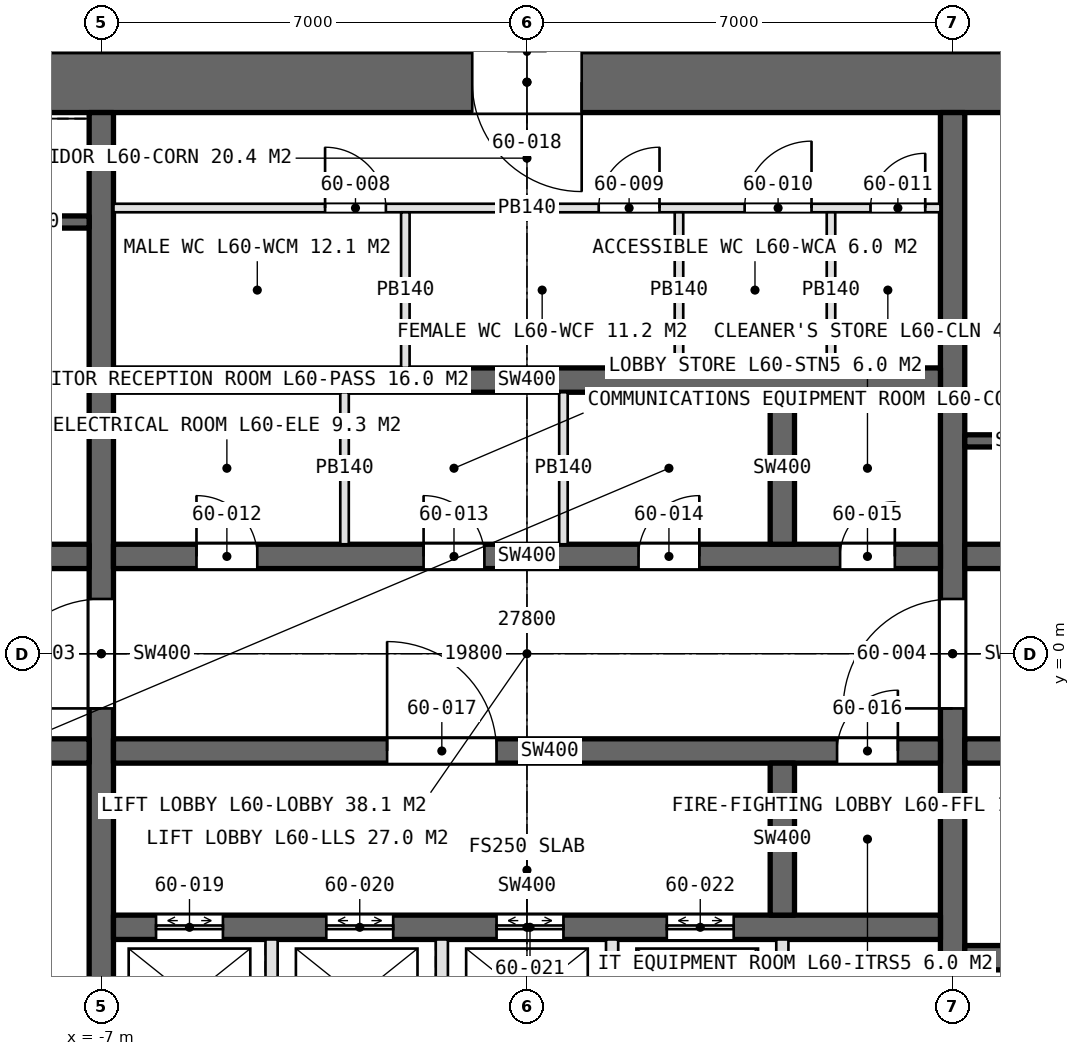
"""IFC4 building model, lengths in metres.
Left out: names, types, materials, properties, quantities, classifications, styles, units other than length and angle.
Written with IfcOpenShell. Run it as: python <this file> out.ifc"""

import sys

from ifc_helpers import new_model, si_unit, direction, frame, frame_2d, origin, place, context, subcontext, project, spatial, rectangle, extrude, element, fill, save


model = new_model("IFC4")
c1 = context("Model", 3, precision=1e-05, world=origin(), true_north=direction((0.0, 1.0)))
c2 = subcontext(c1, "Body", "Model", "MODEL_VIEW")
j1 = project(units=[si_unit("LENGTHUNIT", "METRE"), si_unit("PLANEANGLEUNIT", "RADIAN")], contexts=[c1])
p1 = place(None, origin())
s1 = spatial("IfcSite", under=j1, at=p1, CompositionType="ELEMENT")
p2 = place(p1, origin())
s2 = spatial("IfcBuilding", under=s1, at=p2, CompositionType="ELEMENT")
p3 = place(p2, frame((0.0, 0.0, 271.2)))
s3 = spatial("IfcBuildingStorey", under=s2, at=p3, CompositionType="ELEMENT", Elevation=271.2)
p4 = place(p3, frame((13.9, 9.4, 0.0), z_axis=(0.0, 0.0, 1.0), x_axis=(-1.0, 0.0, 0.0)))
e1 = element("IfcWall", 1, at=p4, inside=s3, PredefinedType="SHEAR", context=c2, shape_type="SweptSolid", body=[
    extrude(rectangle(XDim=27.8, YDim=1.0, at=frame_2d((13.9, 0.0))), origin(), (0.0, 0.0, 1.0), 4.2),
])
p5 = place(p4, frame((23.9, 0.0, 0.0)))
e2 = element("IfcOpeningElement", 2, at=p5, cuts=e1, PredefinedType="OPENING", context=c2, shape_type="SweptSolid", body=[
    extrude(rectangle(XDim=1.0, YDim=2.4, at=frame_2d((0.5, 1.2))), frame((0.0, 0.51, 0.0), z_axis=(0.0, -1.0, 0.0), x_axis=(1.0, 0.0, 0.0)), (0.0, 0.0, 1.0), 1.02),
])
p6 = place(p4, frame((13.0, 0.0, 0.0)))
e3 = element("IfcOpeningElement", 3, at=p6, cuts=e1, PredefinedType="OPENING", context=c2, shape_type="SweptSolid", body=[
    extrude(rectangle(XDim=1.8, YDim=2.4, at=frame_2d((0.9, 1.2))), frame((0.0, 0.51, 0.0), z_axis=(0.0, -1.0, 0.0), x_axis=(1.0, 0.0, 0.0)), (0.0, 0.0, 1.0), 1.02),
])
p7 = place(p3, frame((-7.0, -8.9, 0.0), z_axis=(0.0, 0.0, 1.0), x_axis=(0.0, 1.0, 0.0)))
e4 = element("IfcWall", 4, at=p7, inside=s3, PredefinedType="SHEAR", context=c2, shape_type="SweptSolid", body=[
    extrude(rectangle(XDim=17.8, YDim=0.4, at=frame_2d((8.9, 0.0))), origin(), (0.0, 0.0, 1.0), 4.2),
])
p8 = place(p7, frame((8.0, 0.0, 0.0)))
e5 = element("IfcOpeningElement", 5, at=p8, cuts=e4, PredefinedType="OPENING", context=c2, shape_type="SweptSolid", body=[
    extrude(rectangle(XDim=1.8, YDim=2.4, at=frame_2d((0.9, 1.2))), frame((0.0, 0.21, 0.0), z_axis=(0.0, -1.0, 0.0), x_axis=(1.0, 0.0, 0.0)), (0.0, 0.0, 1.0), 0.42),
])
p9 = place(p3, frame((7.0, -8.9, 0.0), z_axis=(0.0, 0.0, 1.0), x_axis=(0.0, 1.0, 0.0)))
e6 = element("IfcWall", 6, at=p9, inside=s3, PredefinedType="SHEAR", context=c2, shape_type="SweptSolid", body=[
    extrude(rectangle(XDim=17.8, YDim=0.4, at=frame_2d((8.9, 0.0))), origin(), (0.0, 0.0, 1.0), 4.2),
])
p10 = place(p9, frame((8.0, 0.0, 0.0)))
e7 = element("IfcOpeningElement", 7, at=p10, cuts=e6, PredefinedType="OPENING", context=c2, shape_type="SweptSolid", body=[
    extrude(rectangle(XDim=1.8, YDim=2.4, at=frame_2d((0.9, 1.2))), frame((0.0, 0.21, 0.0), z_axis=(0.0, -1.0, 0.0), x_axis=(1.0, 0.0, 0.0)), (0.0, 0.0, 1.0), 0.42),
])
p11 = place(p3, frame((-6.8, 1.6, 0.0), z_axis=(0.0, 0.0, 1.0), x_axis=(1.0, 0.0, 0.0)))
e8 = element("IfcWall", 8, at=p11, inside=s3, PredefinedType="SHEAR", context=c2, shape_type="SweptSolid", body=[
    extrude(rectangle(XDim=13.6, YDim=0.4, at=frame_2d((6.8, 0.0))), origin(), (0.0, 0.0, 1.0), 4.2),
])
p12 = place(p11, frame((1.365, 0.0, 0.0)))
e9 = element("IfcOpeningElement", 9, at=p12, cuts=e8, PredefinedType="OPENING", context=c2, shape_type="SweptSolid", body=[
    extrude(rectangle(XDim=1.0, YDim=2.4, at=frame_2d((0.5, 1.2))), frame((0.0, 0.21, 0.0), z_axis=(0.0, -1.0, 0.0), x_axis=(1.0, 0.0, 0.0)), (0.0, 0.0, 1.0), 0.42),
])
p13 = place(p11, frame((5.1, 0.0, 0.0)))
e10 = element("IfcOpeningElement", 10, at=p13, cuts=e8, PredefinedType="OPENING", context=c2, shape_type="SweptSolid", body=[
    extrude(rectangle(XDim=1.0, YDim=2.4, at=frame_2d((0.5, 1.2))), frame((0.0, 0.21, 0.0), z_axis=(0.0, -1.0, 0.0), x_axis=(1.0, 0.0, 0.0)), (0.0, 0.0, 1.0), 0.42),
])
p14 = place(p11, frame((8.635, 0.0, 0.0)))
e11 = element("IfcOpeningElement", 11, at=p14, cuts=e8, PredefinedType="OPENING", context=c2, shape_type="SweptSolid", body=[
    extrude(rectangle(XDim=1.0, YDim=2.4, at=frame_2d((0.5, 1.2))), frame((0.0, 0.21, 0.0), z_axis=(0.0, -1.0, 0.0), x_axis=(1.0, 0.0, 0.0)), (0.0, 0.0, 1.0), 0.42),
])
p15 = place(p11, frame((11.95, 0.0, 0.0)))
e12 = element("IfcOpeningElement", 12, at=p15, cuts=e8, PredefinedType="OPENING", context=c2, shape_type="SweptSolid", body=[
    extrude(rectangle(XDim=0.9, YDim=2.4, at=frame_2d((0.45, 1.2))), frame((0.0, 0.21, 0.0), z_axis=(0.0, -1.0, 0.0), x_axis=(1.0, 0.0, 0.0)), (0.0, 0.0, 1.0), 0.42),
])
p16 = place(p3, frame((-6.8, -1.6, 0.0), z_axis=(0.0, 0.0, 1.0), x_axis=(1.0, 0.0, 0.0)))
e13 = element("IfcWall", 13, at=p16, inside=s3, PredefinedType="SHEAR", context=c2, shape_type="SweptSolid", body=[
    extrude(rectangle(XDim=13.6, YDim=0.4, at=frame_2d((6.8, 0.0))), origin(), (0.0, 0.0, 1.0), 4.2),
])
p17 = place(p16, frame((11.9, 0.0, 0.0)))
e14 = element("IfcOpeningElement", 14, at=p17, cuts=e13, PredefinedType="OPENING", context=c2, shape_type="SweptSolid", body=[
    extrude(rectangle(XDim=1.0, YDim=2.4, at=frame_2d((0.5, 1.2))), frame((0.0, 0.21, 0.0), z_axis=(0.0, -1.0, 0.0), x_axis=(1.0, 0.0, 0.0)), (0.0, 0.0, 1.0), 0.42),
])
p18 = place(p16, frame((4.5, 0.0, 0.0)))
e15 = element("IfcOpeningElement", 15, at=p18, cuts=e13, PredefinedType="OPENING", context=c2, shape_type="SweptSolid", body=[
    extrude(rectangle(XDim=1.8, YDim=2.4, at=frame_2d((0.9, 1.2))), frame((0.0, 0.21, 0.0), z_axis=(0.0, -1.0, 0.0), x_axis=(1.0, 0.0, 0.0)), (0.0, 0.0, 1.0), 0.42),
])
p19 = place(p3, frame((-6.8, 4.5, 0.0), z_axis=(0.0, 0.0, 1.0), x_axis=(1.0, 0.0, 0.0)))
e16 = element("IfcWall", 16, at=p19, inside=s3, PredefinedType="SHEAR", context=c2, shape_type="SweptSolid", body=[
    extrude(rectangle(XDim=13.6, YDim=0.4, at=frame_2d((6.8, 0.0))), origin(), (0.0, 0.0, 1.0), 4.2),
])
p20 = place(p3, frame((-6.8, -4.5, 0.0), z_axis=(0.0, 0.0, 1.0), x_axis=(1.0, 0.0, 0.0)))
e17 = element("IfcWall", 17, at=p20, inside=s3, PredefinedType="SHEAR", context=c2, shape_type="SweptSolid", body=[
    extrude(rectangle(XDim=13.6, YDim=0.4, at=frame_2d((6.8, 0.0))), origin(), (0.0, 0.0, 1.0), 4.2),
])
p21 = place(p20, frame((0.7, 0.0, 0.0)))
e18 = element("IfcOpeningElement", 18, at=p21, cuts=e17, PredefinedType="OPENING", context=c2, shape_type="SweptSolid", body=[
    extrude(rectangle(XDim=1.1, YDim=2.4, at=frame_2d((0.55, 1.2))), frame((0.0, 0.21, 0.0), z_axis=(0.0, -1.0, 0.0), x_axis=(1.0, 0.0, 0.0)), (0.0, 0.0, 1.0), 0.42),
])
p22 = place(p20, frame((3.5, 0.0, 0.0)))
e19 = element("IfcOpeningElement", 19, at=p22, cuts=e17, PredefinedType="OPENING", context=c2, shape_type="SweptSolid", body=[
    extrude(rectangle(XDim=1.1, YDim=2.4, at=frame_2d((0.55, 1.2))), frame((0.0, 0.21, 0.0), z_axis=(0.0, -1.0, 0.0), x_axis=(1.0, 0.0, 0.0)), (0.0, 0.0, 1.0), 0.42),
])
p23 = place(p20, frame((6.3, 0.0, 0.0)))
e20 = element("IfcOpeningElement", 20, at=p23, cuts=e17, PredefinedType="OPENING", context=c2, shape_type="SweptSolid", body=[
    extrude(rectangle(XDim=1.1, YDim=2.4, at=frame_2d((0.55, 1.2))), frame((0.0, 0.21, 0.0), z_axis=(0.0, -1.0, 0.0), x_axis=(1.0, 0.0, 0.0)), (0.0, 0.0, 1.0), 0.42),
])
p24 = place(p20, frame((9.1, 0.0, 0.0)))
e21 = element("IfcOpeningElement", 21, at=p24, cuts=e17, PredefinedType="OPENING", context=c2, shape_type="SweptSolid", body=[
    extrude(rectangle(XDim=1.1, YDim=2.4, at=frame_2d((0.55, 1.2))), frame((0.0, 0.21, 0.0), z_axis=(0.0, -1.0, 0.0), x_axis=(1.0, 0.0, 0.0)), (0.0, 0.0, 1.0), 0.42),
])
for number, where, z_axis, x_axis in (
    (22, (-12.9, 1.6, 0.0), (0.0, 0.0, 1.0), (1.0, 0.0, 0.0)),
    (23, (-12.9, -1.6, 0.0), (0.0, 0.0, 1.0), (1.0, 0.0, 0.0)),
):
    element("IfcWall", number, at=place(p3, frame(where, z_axis=z_axis, x_axis=x_axis)), inside=s3, PredefinedType="SHEAR", context=c2, shape_type="SweptSolid", body=[
        extrude(rectangle(XDim=5.7, YDim=0.4, at=frame_2d((2.85, 0.0))), origin(), (0.0, 0.0, 1.0), 4.2),
    ])
p25 = place(p3, frame((7.2, 1.6, 0.0), z_axis=(0.0, 0.0, 1.0), x_axis=(1.0, 0.0, 0.0)))
e24 = element("IfcWall", 24, at=p25, inside=s3, PredefinedType="SHEAR", context=c2, shape_type="SweptSolid", body=[
    extrude(rectangle(XDim=5.7, YDim=0.4, at=frame_2d((2.85, 0.0))), origin(), (0.0, 0.0, 1.0), 4.2),
])
p26 = place(p25, frame((0.7, 0.0, 0.0)))
e25 = element("IfcOpeningElement", 25, at=p26, cuts=e24, PredefinedType="OPENING", context=c2, shape_type="SweptSolid", body=[
    extrude(rectangle(XDim=1.0, YDim=2.4, at=frame_2d((0.5, 1.2))), frame((0.0, 0.21, 0.0), z_axis=(0.0, -1.0, 0.0), x_axis=(1.0, 0.0, 0.0)), (0.0, 0.0, 1.0), 0.42),
])
p27 = place(p3, frame((7.2, -1.6, 0.0), z_axis=(0.0, 0.0, 1.0), x_axis=(1.0, 0.0, 0.0)))
e26 = element("IfcWall", 26, at=p27, inside=s3, PredefinedType="SHEAR", context=c2, shape_type="SweptSolid", body=[
    extrude(rectangle(XDim=5.7, YDim=0.4, at=frame_2d((2.85, 0.0))), origin(), (0.0, 0.0, 1.0), 4.2),
])
p28 = place(p27, frame((0.9, 0.0, 0.0)))
e27 = element("IfcOpeningElement", 27, at=p28, cuts=e26, PredefinedType="OPENING", context=c2, shape_type="SweptSolid", body=[
    extrude(rectangle(XDim=1.3, YDim=2.4, at=frame_2d((0.65, 1.2))), frame((0.0, 0.21, 0.0), z_axis=(0.0, -1.0, 0.0), x_axis=(1.0, 0.0, 0.0)), (0.0, 0.0, 1.0), 0.42),
])
p29 = place(p27, frame((3.95, 0.0, 0.0)))
e28 = element("IfcOpeningElement", 28, at=p29, cuts=e26, PredefinedType="OPENING", context=c2, shape_type="SweptSolid", body=[
    extrude(rectangle(XDim=1.3, YDim=2.4, at=frame_2d((0.65, 1.2))), frame((0.0, 0.21, 0.0), z_axis=(0.0, -1.0, 0.0), x_axis=(1.0, 0.0, 0.0)), (0.0, 0.0, 1.0), 0.42),
])
p30 = place(p3, frame((7.2, -5.0, 0.0), z_axis=(0.0, 0.0, 1.0), x_axis=(1.0, 0.0, 0.0)))
e29 = element("IfcWall", 29, at=p30, inside=s3, PredefinedType="SHEAR", context=c2, shape_type="SweptSolid", body=[
    extrude(rectangle(XDim=5.7, YDim=0.4, at=frame_2d((2.85, 0.0))), origin(), (0.0, 0.0, 1.0), 4.2),
])
for number, where, z_axis, x_axis in (
    (30, (4.2, 1.8, 0.0), (0.0, 0.0, 1.0), (0.0, 1.0, 0.0)),
    (31, (4.2, -4.3, 0.0), (0.0, 0.0, 1.0), (0.0, 1.0, 0.0)),
):
    element("IfcWall", number, at=place(p3, frame(where, z_axis=z_axis, x_axis=x_axis)), inside=s3, PredefinedType="SHEAR", context=c2, shape_type="SweptSolid", body=[
        extrude(rectangle(XDim=2.5, YDim=0.4, at=frame_2d((1.25, 0.0))), origin(), (0.0, 0.0, 1.0), 4.2),
    ])
p31 = place(p3, frame((-6.8, 7.33, 0.0), z_axis=(0.0, 0.0, 1.0), x_axis=(1.0, 0.0, 0.0)))
e32 = element("IfcWall", 32, at=p31, inside=s3, PredefinedType="PARTITIONING", context=c2, shape_type="SweptSolid", body=[
    extrude(rectangle(XDim=13.6, YDim=0.14, at=frame_2d((6.8, 0.0))), origin(), (0.0, 0.0, 1.0), 3.95),
])
p32 = place(p31, frame((3.48, 0.0, 0.0)))
e33 = element("IfcOpeningElement", 33, at=p32, cuts=e32, PredefinedType="OPENING", context=c2, shape_type="SweptSolid", body=[
    extrude(rectangle(XDim=1.0, YDim=2.4, at=frame_2d((0.5, 1.2))), frame((0.0, 0.08, 0.0), z_axis=(0.0, -1.0, 0.0), x_axis=(1.0, 0.0, 0.0)), (0.0, 0.0, 1.0), 0.16),
])
p33 = place(p31, frame((7.98, 0.0, 0.0)))
e34 = element("IfcOpeningElement", 34, at=p33, cuts=e32, PredefinedType="OPENING", context=c2, shape_type="SweptSolid", body=[
    extrude(rectangle(XDim=1.0, YDim=2.4, at=frame_2d((0.5, 1.2))), frame((0.0, 0.08, 0.0), z_axis=(0.0, -1.0, 0.0), x_axis=(1.0, 0.0, 0.0)), (0.0, 0.0, 1.0), 0.16),
])
p34 = place(p31, frame((10.38, 0.0, 0.0)))
e35 = element("IfcOpeningElement", 35, at=p34, cuts=e32, PredefinedType="OPENING", context=c2, shape_type="SweptSolid", body=[
    extrude(rectangle(XDim=1.1, YDim=2.4, at=frame_2d((0.55, 1.2))), frame((0.0, 0.08, 0.0), z_axis=(0.0, -1.0, 0.0), x_axis=(1.0, 0.0, 0.0)), (0.0, 0.0, 1.0), 0.16),
])
p35 = place(p31, frame((12.45, 0.0, 0.0)))
e36 = element("IfcOpeningElement", 36, at=p35, cuts=e32, PredefinedType="OPENING", context=c2, shape_type="SweptSolid", body=[
    extrude(rectangle(XDim=0.9, YDim=2.4, at=frame_2d((0.45, 1.2))), frame((0.0, 0.08, 0.0), z_axis=(0.0, -1.0, 0.0), x_axis=(1.0, 0.0, 0.0)), (0.0, 0.0, 1.0), 0.16),
])
for number, where, z_axis, x_axis in (
    (37, (-2.0, 4.7, 0.0), (0.0, 0.0, 1.0), (0.0, 1.0, 0.0)),
    (38, (2.5, 4.7, 0.0), (0.0, 0.0, 1.0), (0.0, 1.0, 0.0)),
    (39, (5.0, 4.7, 0.0), (0.0, 0.0, 1.0), (0.0, 1.0, 0.0)),
):
    element("IfcWall", number, at=place(p3, frame(where, z_axis=z_axis, x_axis=x_axis)), inside=s3, PredefinedType="PARTITIONING", context=c2, shape_type="SweptSolid", body=[
        extrude(rectangle(XDim=2.56, YDim=0.14, at=frame_2d((1.28, 0.0))), origin(), (0.0, 0.0, 1.0), 3.95),
    ])
for number, where, z_axis, x_axis in (
    (40, (-3.0, 1.8, 0.0), (0.0, 0.0, 1.0), (0.0, 1.0, 0.0)),
    (41, (0.6, 1.8, 0.0), (0.0, 0.0, 1.0), (0.0, 1.0, 0.0)),
):
    element("IfcWall", number, at=place(p3, frame(where, z_axis=z_axis, x_axis=x_axis)), inside=s3, PredefinedType="PARTITIONING", context=c2, shape_type="SweptSolid", body=[
        extrude(rectangle(XDim=2.5, YDim=0.14, at=frame_2d((1.25, 0.0))), origin(), (0.0, 0.0, 1.0), 3.95),
    ])
for number, where, z_axis, x_axis in (
    (42, (-4.2, -4.7, 0.0), (0.0, 0.0, 1.0), (0.0, -1.0, 0.0)),
    (43, (-1.4, -4.7, 0.0), (0.0, 0.0, 1.0), (0.0, -1.0, 0.0)),
    (44, (1.4, -4.7, 0.0), (0.0, 0.0, 1.0), (0.0, -1.0, 0.0)),
    (45, (4.2, -4.7, 0.0), (0.0, 0.0, 1.0), (0.0, -1.0, 0.0)),
):
    element("IfcWall", number, at=place(p3, frame(where, z_axis=z_axis, x_axis=x_axis)), inside=s3, PredefinedType="PARTITIONING", context=c2, shape_type="SweptSolid", body=[
        extrude(rectangle(XDim=4.2, YDim=0.2, at=frame_2d((2.1, 0.0))), origin(), (0.0, 0.0, 1.0), 4.2),
    ])
for number, where, z_axis, x_axis in (
    (46, (-9.15, 7.1, 0.0), (0.0, 0.0, 1.0), (1.0, 0.0, 0.0)),
    (47, (9.15, 3.5, 0.0), (0.0, 0.0, 1.0), (-1.0, 0.0, 0.0)),
):
    element("IfcWall", number, at=place(p3, frame(where, z_axis=z_axis, x_axis=x_axis)), inside=s3, PredefinedType="SOLIDWALL", context=c2, shape_type="SweptSolid", body=[
        extrude(rectangle(XDim=1.95, YDim=0.2, at=frame_2d((0.975, 0.0))), origin(), (0.0, 0.0, 1.0), 4.2),
    ])
p36 = place(p8, origin())
e48 = element("IfcDoor", 48, at=p36, inside=s3, OperationType="DOUBLE_DOOR_SINGLE_SWING", PredefinedType="DOOR", context=c2, shape_type="SweptSolid", body=[
    extrude(rectangle(XDim=1.8, YDim=2.4, at=frame_2d((0.9, 1.2))), frame((0.0, 0.025, 0.0), z_axis=(0.0, -1.0, 0.0), x_axis=(1.0, 0.0, 0.0)), (0.0, 0.0, 1.0), 0.05),
])
fill(e5, e48)
p37 = place(p10, origin())
e49 = element("IfcDoor", 49, at=p37, inside=s3, OperationType="DOUBLE_DOOR_SINGLE_SWING", PredefinedType="DOOR", context=c2, shape_type="SweptSolid", body=[
    extrude(rectangle(XDim=1.8, YDim=2.4, at=frame_2d((0.9, 1.2))), frame((0.0, 0.025, 0.0), z_axis=(0.0, -1.0, 0.0), x_axis=(1.0, 0.0, 0.0)), (0.0, 0.0, 1.0), 0.05),
])
fill(e7, e49)
p38 = place(p32, origin())
e50 = element("IfcDoor", 50, at=p38, inside=s3, OperationType="SINGLE_SWING_LEFT", PredefinedType="DOOR", context=c2, shape_type="SweptSolid", body=[
    extrude(rectangle(XDim=1.0, YDim=2.4, at=frame_2d((0.5, 1.2))), frame((0.0, 0.025, 0.0), z_axis=(0.0, -1.0, 0.0), x_axis=(1.0, 0.0, 0.0)), (0.0, 0.0, 1.0), 0.05),
])
fill(e33, e50)
p39 = place(p33, origin())
e51 = element("IfcDoor", 51, at=p39, inside=s3, OperationType="SINGLE_SWING_RIGHT", PredefinedType="DOOR", context=c2, shape_type="SweptSolid", body=[
    extrude(rectangle(XDim=1.0, YDim=2.4, at=frame_2d((0.5, 1.2))), frame((0.0, 0.025, 0.0), z_axis=(0.0, -1.0, 0.0), x_axis=(1.0, 0.0, 0.0)), (0.0, 0.0, 1.0), 0.05),
])
fill(e34, e51)
p40 = place(p34, origin())
e52 = element("IfcDoor", 52, at=p40, inside=s3, OperationType="SINGLE_SWING_RIGHT", PredefinedType="DOOR", context=c2, shape_type="SweptSolid", body=[
    extrude(rectangle(XDim=1.1, YDim=2.4, at=frame_2d((0.55, 1.2))), frame((0.0, 0.025, 0.0), z_axis=(0.0, -1.0, 0.0), x_axis=(1.0, 0.0, 0.0)), (0.0, 0.0, 1.0), 0.05),
])
fill(e35, e52)
p41 = place(p35, origin())
e53 = element("IfcDoor", 53, at=p41, inside=s3, OperationType="SINGLE_SWING_RIGHT", PredefinedType="DOOR", context=c2, shape_type="SweptSolid", body=[
    extrude(rectangle(XDim=0.9, YDim=2.4, at=frame_2d((0.45, 1.2))), frame((0.0, 0.025, 0.0), z_axis=(0.0, -1.0, 0.0), x_axis=(1.0, 0.0, 0.0)), (0.0, 0.0, 1.0), 0.05),
])
fill(e36, e53)
p42 = place(p12, origin())
e54 = element("IfcDoor", 54, at=p42, inside=s3, OperationType="SINGLE_SWING_LEFT", PredefinedType="DOOR", context=c2, shape_type="SweptSolid", body=[
    extrude(rectangle(XDim=1.0, YDim=2.4, at=frame_2d((0.5, 1.2))), frame((0.0, 0.025, 0.0), z_axis=(0.0, -1.0, 0.0), x_axis=(1.0, 0.0, 0.0)), (0.0, 0.0, 1.0), 0.05),
])
fill(e9, e54)
p43 = place(p13, origin())
e55 = element("IfcDoor", 55, at=p43, inside=s3, OperationType="SINGLE_SWING_LEFT", PredefinedType="DOOR", context=c2, shape_type="SweptSolid", body=[
    extrude(rectangle(XDim=1.0, YDim=2.4, at=frame_2d((0.5, 1.2))), frame((0.0, 0.025, 0.0), z_axis=(0.0, -1.0, 0.0), x_axis=(1.0, 0.0, 0.0)), (0.0, 0.0, 1.0), 0.05),
])
fill(e10, e55)
p44 = place(p14, origin())
e56 = element("IfcDoor", 56, at=p44, inside=s3, OperationType="SINGLE_SWING_RIGHT", PredefinedType="DOOR", context=c2, shape_type="SweptSolid", body=[
    extrude(rectangle(XDim=1.0, YDim=2.4, at=frame_2d((0.5, 1.2))), frame((0.0, 0.025, 0.0), z_axis=(0.0, -1.0, 0.0), x_axis=(1.0, 0.0, 0.0)), (0.0, 0.0, 1.0), 0.05),
])
fill(e11, e56)
p45 = place(p15, origin())
e57 = element("IfcDoor", 57, at=p45, inside=s3, OperationType="SINGLE_SWING_RIGHT", PredefinedType="DOOR", context=c2, shape_type="SweptSolid", body=[
    extrude(rectangle(XDim=0.9, YDim=2.4, at=frame_2d((0.45, 1.2))), frame((0.0, 0.025, 0.0), z_axis=(0.0, -1.0, 0.0), x_axis=(1.0, 0.0, 0.0)), (0.0, 0.0, 1.0), 0.05),
])
fill(e12, e57)
p46 = place(p17, origin())
e58 = element("IfcDoor", 58, at=p46, inside=s3, OperationType="SINGLE_SWING_RIGHT", PredefinedType="DOOR", context=c2, shape_type="SweptSolid", body=[
    extrude(rectangle(XDim=1.0, YDim=2.4, at=frame_2d((0.5, 1.2))), frame((0.0, 0.025, 0.0), z_axis=(0.0, -1.0, 0.0), x_axis=(1.0, 0.0, 0.0)), (0.0, 0.0, 1.0), 0.05),
])
fill(e14, e58)
p47 = place(p18, origin())
e59 = element("IfcDoor", 59, at=p47, inside=s3, OperationType="DOUBLE_DOOR_SINGLE_SWING", PredefinedType="DOOR", context=c2, shape_type="SweptSolid", body=[
    extrude(rectangle(XDim=1.8, YDim=2.4, at=frame_2d((0.9, 1.2))), frame((0.0, 0.025, 0.0), z_axis=(0.0, -1.0, 0.0), x_axis=(1.0, 0.0, 0.0)), (0.0, 0.0, 1.0), 0.05),
])
fill(e15, e59)
p48 = place(p6, origin())
e60 = element("IfcDoor", 60, at=p48, inside=s3, OperationType="DOUBLE_DOOR_SINGLE_SWING", PredefinedType="DOOR", context=c2, shape_type="SweptSolid", body=[
    extrude(rectangle(XDim=1.8, YDim=2.4, at=frame_2d((0.9, 1.2))), frame((0.0, 0.025, 0.0), z_axis=(0.0, -1.0, 0.0), x_axis=(1.0, 0.0, 0.0)), (0.0, 0.0, 1.0), 0.05),
])
fill(e3, e60)
p49 = place(p21, origin())
e61 = element("IfcDoor", 61, at=p49, inside=s3, OperationType="DOUBLE_DOOR_SLIDING", PredefinedType="DOOR", context=c2, shape_type="SweptSolid", body=[
    extrude(rectangle(XDim=1.1, YDim=2.4, at=frame_2d((0.55, 1.2))), frame((0.0, 0.025, 0.0), z_axis=(0.0, -1.0, 0.0), x_axis=(1.0, 0.0, 0.0)), (0.0, 0.0, 1.0), 0.05),
])
fill(e18, e61)
p50 = place(p22, origin())
e62 = element("IfcDoor", 62, at=p50, inside=s3, OperationType="DOUBLE_DOOR_SLIDING", PredefinedType="DOOR", context=c2, shape_type="SweptSolid", body=[
    extrude(rectangle(XDim=1.1, YDim=2.4, at=frame_2d((0.55, 1.2))), frame((0.0, 0.025, 0.0), z_axis=(0.0, -1.0, 0.0), x_axis=(1.0, 0.0, 0.0)), (0.0, 0.0, 1.0), 0.05),
])
fill(e19, e62)
p51 = place(p23, origin())
e63 = element("IfcDoor", 63, at=p51, inside=s3, OperationType="DOUBLE_DOOR_SLIDING", PredefinedType="DOOR", context=c2, shape_type="SweptSolid", body=[
    extrude(rectangle(XDim=1.1, YDim=2.4, at=frame_2d((0.55, 1.2))), frame((0.0, 0.025, 0.0), z_axis=(0.0, -1.0, 0.0), x_axis=(1.0, 0.0, 0.0)), (0.0, 0.0, 1.0), 0.05),
])
fill(e20, e63)
p52 = place(p24, origin())
e64 = element("IfcDoor", 64, at=p52, inside=s3, OperationType="DOUBLE_DOOR_SLIDING", PredefinedType="DOOR", context=c2, shape_type="SweptSolid", body=[
    extrude(rectangle(XDim=1.1, YDim=2.4, at=frame_2d((0.55, 1.2))), frame((0.0, 0.025, 0.0), z_axis=(0.0, -1.0, 0.0), x_axis=(1.0, 0.0, 0.0)), (0.0, 0.0, 1.0), 0.05),
])
fill(e21, e64)
save(model, sys.argv[1])
